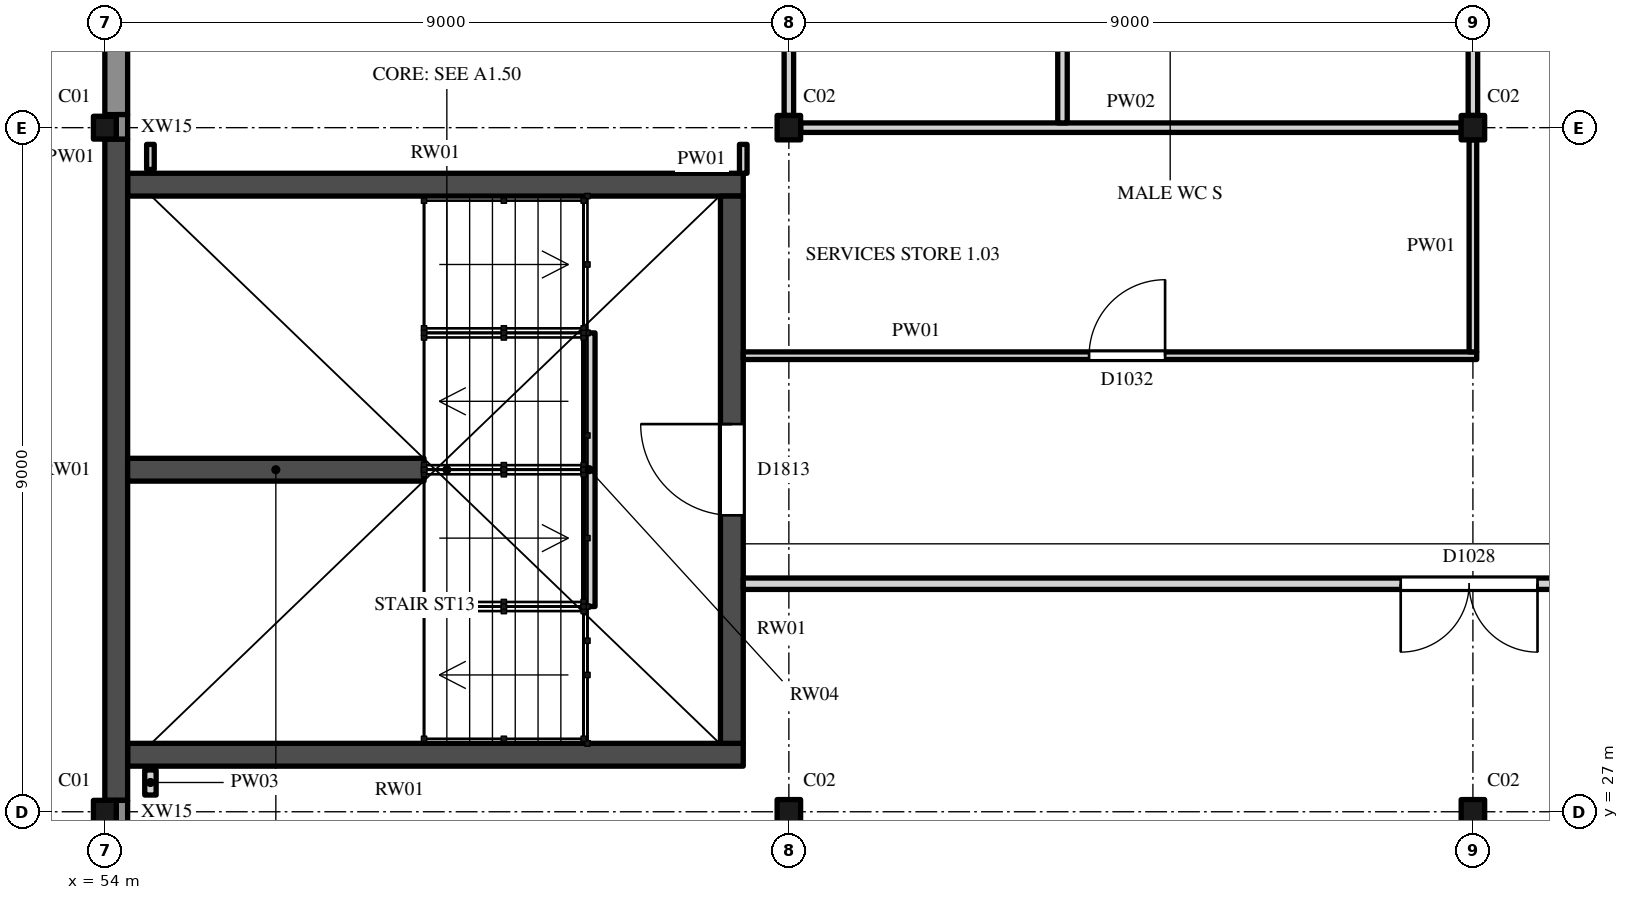
"""IFC4 building model, lengths in metres.
Left out: names, types, materials, properties, quantities, classifications, styles, units other than length and angle.
Written with IfcOpenShell. Run it as: python <this file> out.ifc"""

import sys

from ifc_helpers import new_model, si_unit, direction, frame, frame_2d, origin, origin_2d, place, context, subcontext, project, spatial, rectangle, hollow_rectangle, i_section, extrude, element, fill, save


model = new_model("IFC4")
c1 = context("Model", 3, precision=1e-05, world=origin(), true_north=direction((0.0, 1.0)))
c2 = subcontext(c1, "Body", "Model", "MODEL_VIEW")
j1 = project(units=[si_unit("LENGTHUNIT", "METRE"), si_unit("PLANEANGLEUNIT", "RADIAN")], contexts=[c1])
p1 = place(None, origin())
s1 = spatial("IfcSite", under=j1, at=p1, CompositionType="ELEMENT")
p2 = place(p1, origin())
s2 = spatial("IfcBuilding", under=s1, at=p2, CompositionType="ELEMENT")
p3 = place(p2, frame((0.0, 0.0, 6.0)))
s3 = spatial("IfcBuildingStorey", under=s2, at=p3, CompositionType="ELEMENT", Elevation=6.0)
p4 = place(p3, frame((54.0, 27.0, 0.0), z_axis=(0.0, 0.0, 1.0), x_axis=(1.0, 0.0, 0.0)))
e1 = element("IfcColumn", 1, at=p4, inside=s3, PredefinedType="COLUMN", context=c2, shape_type="SweptSolid", body=[
    extrude(hollow_rectangle(XDim=0.3, YDim=0.3, WallThickness=0.012, InnerFilletRadius=0.019, OuterFilletRadius=0.031, at=origin_2d()), origin(), (0.0, 0.0, 1.0), 5.0),
])
for number, where, z_axis, x_axis in (
    (2, (63.0, 27.0, 0.0), (0.0, 0.0, 1.0), (1.0, 0.0, 0.0)),
    (3, (72.0, 27.0, 0.0), (0.0, 0.0, 1.0), (1.0, 0.0, 0.0)),
):
    element("IfcColumn", number, at=place(p3, frame(where, z_axis=z_axis, x_axis=x_axis)), inside=s3, PredefinedType="COLUMN", context=c2, shape_type="SweptSolid", body=[
        extrude(i_section(OverallWidth=0.309, OverallDepth=0.321, WebThickness=0.014, FlangeThickness=0.022, FilletRadius=0.017, at=origin_2d()), origin(), (0.0, 0.0, 1.0), 5.0),
    ])
p5 = place(p3, frame((54.0, 36.0, 0.0), z_axis=(0.0, 0.0, 1.0), x_axis=(1.0, 0.0, 0.0)))
e4 = element("IfcColumn", 4, at=p5, inside=s3, PredefinedType="COLUMN", context=c2, shape_type="SweptSolid", body=[
    extrude(hollow_rectangle(XDim=0.3, YDim=0.3, WallThickness=0.012, InnerFilletRadius=0.019, OuterFilletRadius=0.031, at=origin_2d()), origin(), (0.0, 0.0, 1.0), 5.0),
])
for number, where, z_axis, x_axis in (
    (5, (63.0, 36.0, 0.0), (0.0, 0.0, 1.0), (1.0, 0.0, 0.0)),
    (6, (72.0, 36.0, 0.0), (0.0, 0.0, 1.0), (1.0, 0.0, 0.0)),
):
    element("IfcColumn", number, at=place(p3, frame(where, z_axis=z_axis, x_axis=x_axis)), inside=s3, PredefinedType="COLUMN", context=c2, shape_type="SweptSolid", body=[
        extrude(i_section(OverallWidth=0.309, OverallDepth=0.321, WebThickness=0.014, FlangeThickness=0.022, FilletRadius=0.017, at=origin_2d()), origin(), (0.0, 0.0, 1.0), 5.0),
    ])
for number, where, z_axis, x_axis in (
    (7, (54.3, 27.75, 0.0), (0.0, 0.0, 1.0), (1.0, 0.0, 0.0)),
    (8, (54.3, 35.25, 0.0), (0.0, 0.0, 1.0), (1.0, 0.0, 0.0)),
):
    element("IfcWall", number, at=place(p3, frame(where, z_axis=z_axis, x_axis=x_axis)), inside=s3, PredefinedType="SHEAR", context=c2, shape_type="SweptSolid", body=[
        extrude(rectangle(XDim=8.1, YDim=0.3, at=frame_2d((4.05, 0.0))), origin(), (0.0, 0.0, 1.0), 5.0),
    ])
p6 = place(p3, frame((54.15, 27.15, 0.0), z_axis=(0.0, 0.0, 1.0), x_axis=(0.0, 1.0, 0.0)))
e9 = element("IfcWall", 9, at=p6, inside=s3, PredefinedType="SHEAR", context=c2, shape_type="SweptSolid", body=[
    extrude(rectangle(XDim=8.7, YDim=0.3, at=frame_2d((4.35, 0.0))), origin(), (0.0, 0.0, 1.0), 5.0),
])
p7 = place(p3, frame((62.25, 27.9, 0.0), z_axis=(0.0, 0.0, 1.0), x_axis=(0.0, 1.0, 0.0)))
e10 = element("IfcWall", 10, at=p7, inside=s3, PredefinedType="SHEAR", context=c2, shape_type="SweptSolid", body=[
    extrude(rectangle(XDim=7.2, YDim=0.3, at=frame_2d((3.6, 0.0))), origin(), (0.0, 0.0, 1.0), 5.0),
])
p8 = place(p7, frame((3.0, 0.0, 0.0)))
e11 = element("IfcOpeningElement", 11, at=p8, cuts=e10, PredefinedType="OPENING", context=c2, shape_type="SweptSolid", body=[
    extrude(rectangle(XDim=1.2, YDim=2.1, at=frame_2d((0.6, 1.05))), frame((0.0, 0.16, 0.0), z_axis=(0.0, -1.0, 0.0), x_axis=(1.0, 0.0, 0.0)), (0.0, 0.0, 1.0), 0.32),
])
p9 = place(p3, frame((58.2, 31.5, 0.0), z_axis=(0.0, 0.0, 1.0), x_axis=(-1.0, 0.0, 0.0)))
e12 = element("IfcWall", 12, at=p9, inside=s3, PredefinedType="SHEAR", context=c2, shape_type="SweptSolid", body=[
    extrude(rectangle(XDim=3.9, YDim=0.3, at=frame_2d((1.95, 0.0))), origin(), (0.0, 0.0, 1.0), 5.0),
])
p10 = place(p3, frame((60.375, 29.7, 0.0), z_axis=(0.0, 0.0, 1.0), x_axis=(0.0, 1.0, 0.0)))
e13 = element("IfcWall", 13, at=p10, inside=s3, PredefinedType="STANDARD", context=c2, shape_type="SweptSolid", body=[
    extrude(rectangle(XDim=3.6, YDim=0.15, at=frame_2d((1.8, 0.0))), origin(), (0.0, 0.0, 1.0), 2.3),
])
p11 = place(p3, frame((54.15, 36.172, 0.0), z_axis=(0.0, 0.0, 1.0), x_axis=(0.0, 1.0, 0.0)))
e14 = element("IfcWall", 14, at=p11, inside=s3, PredefinedType="SOLIDWALL", context=c2, shape_type="SweptSolid", body=[
    extrude(rectangle(XDim=8.667, YDim=0.3, at=frame_2d((4.333, 0.0))), origin(), (0.0, 0.0, 1.0), 4.297),
])
p12 = place(p11, frame((1.478, 0.0, 1.2)))
e15 = element("IfcOpeningElement", 15, at=p12, cuts=e14, PredefinedType="OPENING", context=c2, shape_type="SweptSolid", body=[
    extrude(rectangle(XDim=1.2, YDim=1.5, at=frame_2d((0.6, 0.75))), frame((0.0, 0.16, 0.0), z_axis=(0.0, -1.0, 0.0), x_axis=(1.0, 0.0, 0.0)), (0.0, 0.0, 1.0), 0.32),
])
p13 = place(p11, frame((5.978, 0.0, 1.2)))
e16 = element("IfcOpeningElement", 16, at=p13, cuts=e14, PredefinedType="OPENING", context=c2, shape_type="SweptSolid", body=[
    extrude(rectangle(XDim=1.2, YDim=1.5, at=frame_2d((0.6, 0.75))), frame((0.0, 0.16, 0.0), z_axis=(0.0, -1.0, 0.0), x_axis=(1.0, 0.0, 0.0)), (0.0, 0.0, 1.0), 0.32),
])
for number, where, z_axis, x_axis in (
    (17, (54.225, 26.828, 0.0), (0.0, 0.0, 1.0), (0.0, 1.0, 0.0)),
    (18, (54.225, 35.85, 0.0), (0.0, 0.0, 1.0), (0.0, 1.0, 0.0)),
):
    element("IfcWall", number, at=place(p3, frame(where, z_axis=z_axis, x_axis=x_axis)), inside=s3, PredefinedType="SOLIDWALL", context=c2, shape_type="SweptSolid", body=[
        extrude(rectangle(XDim=0.322, YDim=0.15, at=frame_2d((0.161, 0.0))), origin(), (0.0, 0.0, 1.0), 5.0),
    ])
p14 = place(p3, frame((62.4, 30.0, 0.0), z_axis=(0.0, 0.0, 1.0), x_axis=(1.0, 0.0, 0.0)))
e19 = element("IfcWall", 19, at=p14, inside=s3, PredefinedType="PARTITIONING", context=c2, shape_type="SweptSolid", body=[
    extrude(rectangle(XDim=36.675, YDim=0.15, at=frame_2d((18.337, 0.0))), origin(), (0.0, 0.0, 1.0), 4.419),
])
p15 = place(p14, frame((8.65, 0.0, 0.0)))
e20 = element("IfcOpeningElement", 20, at=p15, cuts=e19, PredefinedType="OPENING", context=c2, shape_type="SweptSolid", body=[
    extrude(rectangle(XDim=1.8, YDim=2.1, at=frame_2d((0.9, 1.05))), frame((0.0, 0.085, 0.0), z_axis=(0.0, -1.0, 0.0), x_axis=(1.0, 0.0, 0.0)), (0.0, 0.0, 1.0), 0.17),
])
p16 = place(p14, frame((26.65, 0.0, 0.0)))
e21 = element("IfcOpeningElement", 21, at=p16, cuts=e19, PredefinedType="OPENING", context=c2, shape_type="SweptSolid", body=[
    extrude(rectangle(XDim=1.8, YDim=2.1, at=frame_2d((0.9, 1.05))), frame((0.0, 0.085, 0.0), z_axis=(0.0, -1.0, 0.0), x_axis=(1.0, 0.0, 0.0)), (0.0, 0.0, 1.0), 0.17),
])
p17 = place(p3, frame((62.4, 33.0, 0.0), z_axis=(0.0, 0.0, 1.0), x_axis=(1.0, 0.0, 0.0)))
e22 = element("IfcWall", 22, at=p17, inside=s3, PredefinedType="PARTITIONING", context=c2, shape_type="SweptSolid", body=[
    extrude(rectangle(XDim=9.65, YDim=0.1, at=frame_2d((4.825, 0.0))), origin(), (0.0, 0.0, 1.0), 4.419),
])
p18 = place(p17, frame((4.55, 0.0, 0.0)))
e23 = element("IfcOpeningElement", 23, at=p18, cuts=e22, PredefinedType="OPENING", context=c2, shape_type="SweptSolid", body=[
    extrude(rectangle(XDim=1.0, YDim=2.1, at=frame_2d((0.5, 1.05))), frame((0.0, 0.06, 0.0), z_axis=(0.0, -1.0, 0.0), x_axis=(1.0, 0.0, 0.0)), (0.0, 0.0, 1.0), 0.12),
])
p19 = place(p3, frame((63.155, 36.0, 0.0), z_axis=(0.0, 0.0, 1.0), x_axis=(1.0, 0.0, 0.0)))
e24 = element("IfcWall", 24, at=p19, inside=s3, PredefinedType="PARTITIONING", context=c2, shape_type="SweptSolid", body=[
    extrude(rectangle(XDim=8.691, YDim=0.125, at=frame_2d((4.345, 0.0))), origin(), (0.0, 0.0, 1.0), 4.419),
])
p20 = place(p3, frame((54.6, 27.22, 0.0), z_axis=(0.0, 0.0, 1.0), x_axis=(0.0, 1.0, 0.0)))
e25 = element("IfcWall", 25, at=p20, inside=s3, PredefinedType="PARTITIONING", context=c2, shape_type="SweptSolid", body=[
    extrude(rectangle(XDim=0.33, YDim=0.15, at=frame_2d((0.165, 0.0))), origin(), (0.0, 0.0, 1.0), 4.825),
])
p21 = place(p3, frame((54.6, 35.45, 0.0), z_axis=(0.0, 0.0, 1.0), x_axis=(0.0, 1.0, 0.0)))
e26 = element("IfcWall", 26, at=p21, inside=s3, PredefinedType="PARTITIONING", context=c2, shape_type="SweptSolid", body=[
    extrude(rectangle(XDim=0.33, YDim=0.1, at=frame_2d((0.165, 0.0))), origin(), (0.0, 0.0, 1.0), 4.825),
])
p22 = place(p3, frame((62.4, 35.4, 0.0), z_axis=(0.0, 0.0, 1.0), x_axis=(0.0, 1.0, 0.0)))
e27 = element("IfcWall", 27, at=p22, inside=s3, PredefinedType="PARTITIONING", context=c2, shape_type="SweptSolid", body=[
    extrude(rectangle(XDim=0.38, YDim=0.1, at=frame_2d((0.19, 0.0))), origin(), (0.0, 0.0, 1.0), 4.825),
])
p23 = place(p3, frame((63.0, 36.16, 0.0), z_axis=(0.0, 0.0, 1.0), x_axis=(0.0, 1.0, 0.0)))
e28 = element("IfcWall", 28, at=p23, inside=s3, PredefinedType="PARTITIONING", context=c2, shape_type="SweptSolid", body=[
    extrude(rectangle(XDim=8.679, YDim=0.125, at=frame_2d((4.34, 0.0))), origin(), (0.0, 0.0, 1.0), 4.297),
])
p24 = place(p23, frame((3.59, 0.0, 0.0)))
e29 = element("IfcOpeningElement", 29, at=p24, cuts=e28, PredefinedType="OPENING", context=c2, shape_type="SweptSolid", body=[
    extrude(rectangle(XDim=0.95, YDim=2.1, at=frame_2d((0.475, 1.05))), frame((0.0, 0.073, 0.0), z_axis=(0.0, -1.0, 0.0), x_axis=(1.0, 0.0, 0.0)), (0.0, 0.0, 1.0), 0.145),
])
p25 = place(p3, frame((66.6, 36.062, 0.0), z_axis=(0.0, 0.0, 1.0), x_axis=(0.0, 1.0, 0.0)))
e30 = element("IfcWall", 30, at=p25, inside=s3, PredefinedType="PARTITIONING", context=c2, shape_type="SweptSolid", body=[
    extrude(rectangle(XDim=2.875, YDim=0.125, at=frame_2d((1.438, 0.0))), origin(), (0.0, 0.0, 1.0), 4.825),
])
p26 = place(p3, frame((72.0, 33.05, 0.0), z_axis=(0.0, 0.0, 1.0), x_axis=(0.0, 1.0, 0.0)))
e31 = element("IfcWall", 31, at=p26, inside=s3, PredefinedType="PARTITIONING", context=c2, shape_type="SweptSolid", body=[
    extrude(rectangle(XDim=2.79, YDim=0.1, at=frame_2d((1.395, 0.0))), origin(), (0.0, 0.0, 1.0), 4.297),
])
p27 = place(p3, frame((72.0, 36.16, 0.0), z_axis=(0.0, 0.0, 1.0), x_axis=(0.0, 1.0, 0.0)))
e32 = element("IfcWall", 32, at=p27, inside=s3, PredefinedType="PARTITIONING", context=c2, shape_type="SweptSolid", body=[
    extrude(rectangle(XDim=2.777, YDim=0.125, at=frame_2d((1.389, 0.0))), origin(), (0.0, 0.0, 1.0), 4.297),
])
p28 = place(p8, origin())
e33 = element("IfcDoor", 33, at=p28, inside=s3, OperationType="SINGLE_SWING_LEFT", PredefinedType="DOOR", context=c2, shape_type="SweptSolid", body=[
    extrude(rectangle(XDim=1.2, YDim=2.1, at=frame_2d((0.6, 1.05))), frame((0.0, 0.025, 0.0), z_axis=(0.0, -1.0, 0.0), x_axis=(1.0, 0.0, 0.0)), (0.0, 0.0, 1.0), 0.05),
])
fill(e11, e33)
p29 = place(p15, origin())
e34 = element("IfcDoor", 34, at=p29, inside=s3, OperationType="DOUBLE_DOOR_SINGLE_SWING", PredefinedType="DOOR", context=c2, shape_type="SweptSolid", body=[
    extrude(rectangle(XDim=1.8, YDim=2.1, at=frame_2d((0.9, 1.05))), frame((0.0, 0.025, 0.0), z_axis=(0.0, -1.0, 0.0), x_axis=(1.0, 0.0, 0.0)), (0.0, 0.0, 1.0), 0.05),
])
fill(e20, e34)
p30 = place(p18, origin())
e35 = element("IfcDoor", 35, at=p30, inside=s3, OperationType="SINGLE_SWING_LEFT", PredefinedType="DOOR", context=c2, shape_type="SweptSolid", body=[
    extrude(rectangle(XDim=1.0, YDim=2.1, at=frame_2d((0.5, 1.05))), frame((0.0, 0.025, 0.0), z_axis=(0.0, -1.0, 0.0), x_axis=(1.0, 0.0, 0.0)), (0.0, 0.0, 1.0), 0.05),
])
fill(e23, e35)
save(model, sys.argv[1])
